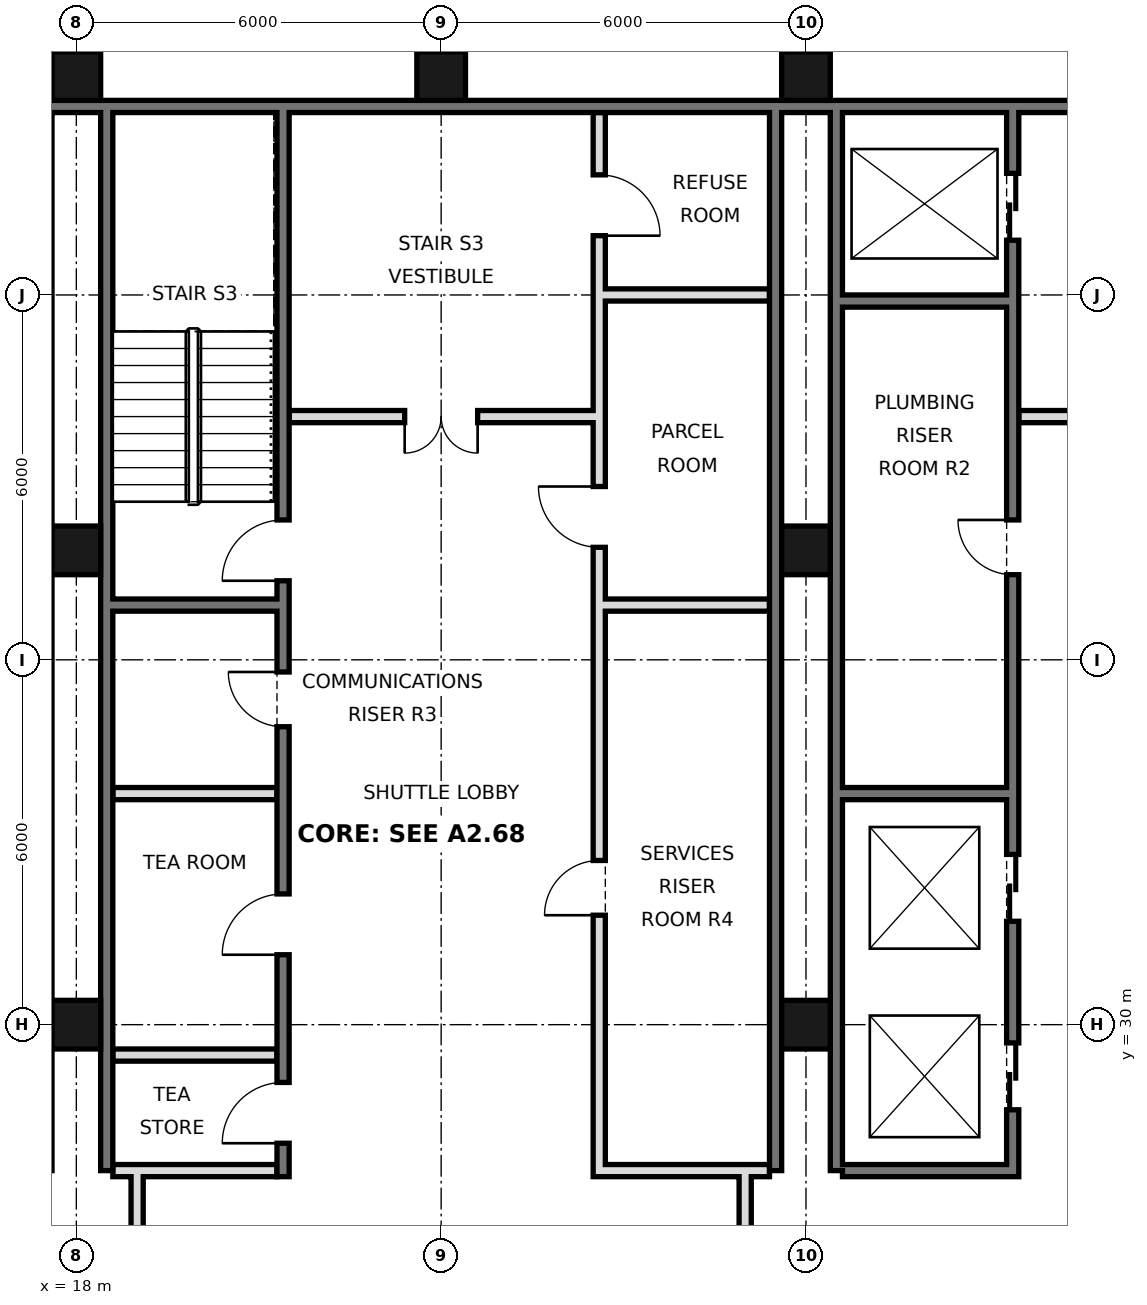
"""IFC4 building model, lengths in metres.
Left out: names, types, materials, properties, quantities, classifications, styles, units other than length and angle.
Written with IfcOpenShell. Run it as: python <this file> out.ifc"""

import sys

from ifc_helpers import new_model, si_unit, direction, frame, frame_2d, origin, origin_2d, place, context, subcontext, project, spatial, rectangle, hollow_rectangle, extrude, element, fill, save


model = new_model("IFC4")
c1 = context("Model", 3, precision=1e-05, world=origin(), true_north=direction((0.0, 1.0)))
c2 = subcontext(c1, "Body", "Model", "MODEL_VIEW")
j1 = project(units=[si_unit("LENGTHUNIT", "METRE"), si_unit("PLANEANGLEUNIT", "RADIAN")], contexts=[c1])
p1 = place(None, origin())
s1 = spatial("IfcSite", under=j1, at=p1, CompositionType="ELEMENT")
p2 = place(p1, origin())
s2 = spatial("IfcBuilding", under=s1, at=p2, CompositionType="ELEMENT")
p3 = place(p2, frame((0.0, 0.0, 270.2)))
s3 = spatial("IfcBuildingStorey", under=s2, at=p3, CompositionType="ELEMENT", Elevation=270.2)
for number, where, z_axis, x_axis in (
    (1, (18.0, 30.0, 0.0), (0.0, 0.0, 1.0), (1.0, 0.0, 0.0)),
    (2, (18.0, 37.8, 0.0), (0.0, 0.0, 1.0), (1.0, 0.0, 0.0)),
    (3, (18.0, 45.6, 0.0), (0.0, 0.0, 1.0), (1.0, 0.0, 0.0)),
    (4, (24.0, 45.6, 0.0), (0.0, 0.0, 1.0), (1.0, 0.0, 0.0)),
    (5, (30.0, 30.0, 0.0), (0.0, 0.0, 1.0), (1.0, 0.0, 0.0)),
    (6, (30.0, 37.8, 0.0), (0.0, 0.0, 1.0), (1.0, 0.0, 0.0)),
    (7, (30.0, 45.6, 0.0), (0.0, 0.0, 1.0), (1.0, 0.0, 0.0)),
):
    element("IfcColumn", number, at=place(p3, frame(where, z_axis=z_axis, x_axis=x_axis)), inside=s3, PredefinedType="COLUMN", context=c2, shape_type="SweptSolid", body=[
        extrude(hollow_rectangle(XDim=0.8, YDim=0.8, WallThickness=0.032, at=origin_2d()), origin(), (0.0, 0.0, 1.0), 3.6),
    ])
p4 = place(p3, frame((6.6, 45.1, 0.0), z_axis=(0.0, 0.0, 1.0), x_axis=(1.0, 0.0, 0.0)))
e8 = element("IfcWall", 8, at=p4, inside=s3, PredefinedType="SOLIDWALL", context=c2, shape_type="SweptSolid", body=[
    extrude(rectangle(XDim=34.8, YDim=0.2, at=frame_2d((17.4, 0.0))), origin(), (0.0, 0.0, 1.0), 3.42),
])
for number, where, z_axis, x_axis in (
    (9, (18.5, 27.6, 0.0), (0.0, 0.0, 1.0), (0.0, 1.0, 0.0)),
    (10, (29.5, 27.6, 0.0), (0.0, 0.0, 1.0), (0.0, 1.0, 0.0)),
    (11, (30.5, 27.6, 0.0), (0.0, 0.0, 1.0), (0.0, 1.0, 0.0)),
):
    element("IfcWall", number, at=place(p3, frame(where, z_axis=z_axis, x_axis=x_axis)), inside=s3, PredefinedType="SOLIDWALL", context=c2, shape_type="SweptSolid", body=[
        extrude(rectangle(XDim=17.5, YDim=0.2, at=frame_2d((8.75, 0.0))), origin(), (0.0, 0.0, 1.0), 3.42),
    ])
p5 = place(p3, frame((19.0, 21.6, 0.0), z_axis=(0.0, 0.0, 1.0), x_axis=(0.0, 1.0, 0.0)))
e12 = element("IfcWall", 12, at=p5, inside=s3, PredefinedType="PARTITIONING", context=c2, shape_type="SweptSolid", body=[
    extrude(rectangle(XDim=6.0, YDim=0.2, at=frame_2d((3.0, 0.0))), origin(), (0.0, 0.0, 1.0), 3.42),
])
p6 = place(p5, frame((2.1, 0.0, 0.0)))
e13 = element("IfcOpeningElement", 13, at=p6, cuts=e12, PredefinedType="OPENING", context=c2, shape_type="SweptSolid", body=[
    extrude(rectangle(XDim=1.8, YDim=2.1, at=frame_2d((0.9, 1.05))), frame((0.0, 0.11, 0.0), z_axis=(0.0, -1.0, 0.0), x_axis=(1.0, 0.0, 0.0)), (0.0, 0.0, 1.0), 0.22),
])
p7 = place(p3, frame((29.0, 21.6, 0.0), z_axis=(0.0, 0.0, 1.0), x_axis=(0.0, 1.0, 0.0)))
e14 = element("IfcWall", 14, at=p7, inside=s3, PredefinedType="PARTITIONING", context=c2, shape_type="SweptSolid", body=[
    extrude(rectangle(XDim=6.0, YDim=0.2, at=frame_2d((3.0, 0.0))), origin(), (0.0, 0.0, 1.0), 3.42),
])
p8 = place(p7, frame((2.1, 0.0, 0.0)))
e15 = element("IfcOpeningElement", 15, at=p8, cuts=e14, PredefinedType="OPENING", context=c2, shape_type="SweptSolid", body=[
    extrude(rectangle(XDim=1.8, YDim=2.1, at=frame_2d((0.9, 1.05))), frame((0.0, 0.11, 0.0), z_axis=(0.0, -1.0, 0.0), x_axis=(1.0, 0.0, 0.0)), (0.0, 0.0, 1.0), 0.22),
])
p9 = place(p3, frame((21.4, 27.5, 0.0), z_axis=(0.0, 0.0, 1.0), x_axis=(0.0, 1.0, 0.0)))
e16 = element("IfcWall", 16, at=p9, inside=s3, PredefinedType="SOLIDWALL", context=c2, shape_type="SweptSolid", body=[
    extrude(rectangle(XDim=17.5, YDim=0.2, at=frame_2d((8.75, 0.0))), origin(), (0.0, 0.0, 1.0), 3.42),
])
p10 = place(p9, frame((0.55, 0.0, 0.0)))
e17 = element("IfcOpeningElement", 17, at=p10, cuts=e16, PredefinedType="OPENING", context=c2, shape_type="SweptSolid", body=[
    extrude(rectangle(XDim=1.0, YDim=2.1, at=frame_2d((0.5, 1.05))), frame((0.0, 0.11, 0.0), z_axis=(0.0, -1.0, 0.0), x_axis=(1.0, 0.0, 0.0)), (0.0, 0.0, 1.0), 0.22),
])
p11 = place(p9, frame((3.65, 0.0, 0.0)))
e18 = element("IfcOpeningElement", 18, at=p11, cuts=e16, PredefinedType="OPENING", context=c2, shape_type="SweptSolid", body=[
    extrude(rectangle(XDim=1.0, YDim=2.1, at=frame_2d((0.5, 1.05))), frame((0.0, 0.11, 0.0), z_axis=(0.0, -1.0, 0.0), x_axis=(1.0, 0.0, 0.0)), (0.0, 0.0, 1.0), 0.22),
])
p12 = place(p9, frame((9.8, 0.0, 0.0)))
e19 = element("IfcOpeningElement", 19, at=p12, cuts=e16, PredefinedType="OPENING", context=c2, shape_type="SweptSolid", body=[
    extrude(rectangle(XDim=1.0, YDim=2.1, at=frame_2d((0.5, 1.05))), frame((0.0, 0.11, 0.0), z_axis=(0.0, -1.0, 0.0), x_axis=(1.0, 0.0, 0.0)), (0.0, 0.0, 1.0), 0.22),
])
p13 = place(p9, frame((7.4, 0.0, 0.0)))
e20 = element("IfcOpeningElement", 20, at=p13, cuts=e16, PredefinedType="OPENING", context=c2, shape_type="SweptSolid", body=[
    extrude(rectangle(XDim=0.9, YDim=2.1, at=frame_2d((0.45, 1.05))), frame((0.0, 0.11, 0.0), z_axis=(0.0, -1.0, 0.0), x_axis=(1.0, 0.0, 0.0)), (0.0, 0.0, 1.0), 0.22),
])
p14 = place(p3, frame((26.6, 27.5, 0.0), z_axis=(0.0, 0.0, 1.0), x_axis=(0.0, 1.0, 0.0)))
e21 = element("IfcWall", 21, at=p14, inside=s3, PredefinedType="SOLIDWALL", context=c2, shape_type="SweptSolid", body=[
    extrude(rectangle(XDim=17.5, YDim=0.2, at=frame_2d((8.75, 0.0))), origin(), (0.0, 0.0, 1.0), 3.42),
])
p15 = place(p14, frame((4.3, 0.0, 0.0)))
e22 = element("IfcOpeningElement", 22, at=p15, cuts=e21, PredefinedType="OPENING", context=c2, shape_type="SweptSolid", body=[
    extrude(rectangle(XDim=0.9, YDim=2.1, at=frame_2d((0.45, 1.05))), frame((0.0, 0.11, 0.0), z_axis=(0.0, -1.0, 0.0), x_axis=(1.0, 0.0, 0.0)), (0.0, 0.0, 1.0), 0.22),
])
p16 = place(p14, frame((10.35, 0.0, 0.0)))
e23 = element("IfcOpeningElement", 23, at=p16, cuts=e21, PredefinedType="OPENING", context=c2, shape_type="SweptSolid", body=[
    extrude(rectangle(XDim=1.0, YDim=2.1, at=frame_2d((0.5, 1.05))), frame((0.0, 0.11, 0.0), z_axis=(0.0, -1.0, 0.0), x_axis=(1.0, 0.0, 0.0)), (0.0, 0.0, 1.0), 0.22),
])
p17 = place(p14, frame((15.475, 0.0, 0.0)))
e24 = element("IfcOpeningElement", 24, at=p17, cuts=e21, PredefinedType="OPENING", context=c2, shape_type="SweptSolid", body=[
    extrude(rectangle(XDim=1.0, YDim=2.1, at=frame_2d((0.5, 1.05))), frame((0.0, 0.11, 0.0), z_axis=(0.0, -1.0, 0.0), x_axis=(1.0, 0.0, 0.0)), (0.0, 0.0, 1.0), 0.22),
])
p18 = place(p3, frame((33.4, 27.5, 0.0), z_axis=(0.0, 0.0, 1.0), x_axis=(0.0, 1.0, 0.0)))
e25 = element("IfcWall", 25, at=p18, inside=s3, PredefinedType="SOLIDWALL", context=c2, shape_type="SweptSolid", body=[
    extrude(rectangle(XDim=17.5, YDim=0.2, at=frame_2d((8.75, 0.0))), origin(), (0.0, 0.0, 1.0), 3.42),
])
p19 = place(p18, frame((1.1, 0.0, 0.0)))
e26 = element("IfcOpeningElement", 26, at=p19, cuts=e25, PredefinedType="OPENING", context=c2, shape_type="SweptSolid", body=[
    extrude(rectangle(XDim=1.1, YDim=2.1, at=frame_2d((0.55, 1.05))), frame((0.0, 0.11, 0.0), z_axis=(0.0, -1.0, 0.0), x_axis=(1.0, 0.0, 0.0)), (0.0, 0.0, 1.0), 0.22),
])
p20 = place(p18, frame((4.2, 0.0, 0.0)))
e27 = element("IfcOpeningElement", 27, at=p20, cuts=e25, PredefinedType="OPENING", context=c2, shape_type="SweptSolid", body=[
    extrude(rectangle(XDim=1.1, YDim=2.1, at=frame_2d((0.55, 1.05))), frame((0.0, 0.11, 0.0), z_axis=(0.0, -1.0, 0.0), x_axis=(1.0, 0.0, 0.0)), (0.0, 0.0, 1.0), 0.22),
])
p21 = place(p18, frame((15.4, 0.0, 0.0)))
e28 = element("IfcOpeningElement", 28, at=p21, cuts=e25, PredefinedType="OPENING", context=c2, shape_type="SweptSolid", body=[
    extrude(rectangle(XDim=1.1, YDim=2.1, at=frame_2d((0.55, 1.05))), frame((0.0, 0.11, 0.0), z_axis=(0.0, -1.0, 0.0), x_axis=(1.0, 0.0, 0.0)), (0.0, 0.0, 1.0), 0.22),
])
p22 = place(p18, frame((9.9, 0.0, 0.0)))
e29 = element("IfcOpeningElement", 29, at=p22, cuts=e25, PredefinedType="OPENING", context=c2, shape_type="SweptSolid", body=[
    extrude(rectangle(XDim=0.9, YDim=2.1, at=frame_2d((0.45, 1.05))), frame((0.0, 0.11, 0.0), z_axis=(0.0, -1.0, 0.0), x_axis=(1.0, 0.0, 0.0)), (0.0, 0.0, 1.0), 0.22),
])
p23 = place(p3, frame((18.6, 27.6, 0.0), z_axis=(0.0, 0.0, 1.0), x_axis=(1.0, 0.0, 0.0)))
e30 = element("IfcWall", 30, at=p23, inside=s3, PredefinedType="PARTITIONING", context=c2, shape_type="SweptSolid", body=[
    extrude(rectangle(XDim=2.7, YDim=0.2, at=frame_2d((1.35, 0.0))), origin(), (0.0, 0.0, 1.0), 3.42),
])
for number, where, z_axis, x_axis in (
    (31, (26.7, 27.6, 0.0), (0.0, 0.0, 1.0), (1.0, 0.0, 0.0)),
    (32, (30.6, 27.6, 0.0), (0.0, 0.0, 1.0), (1.0, 0.0, 0.0)),
):
    element("IfcWall", number, at=place(p3, frame(where, z_axis=z_axis, x_axis=x_axis)), inside=s3, PredefinedType="SOLIDWALL", context=c2, shape_type="SweptSolid", body=[
        extrude(rectangle(XDim=2.7, YDim=0.2, at=frame_2d((1.35, 0.0))), origin(), (0.0, 0.0, 1.0), 3.42),
    ])
p24 = place(p3, frame((18.6, 29.5, 0.0), z_axis=(0.0, 0.0, 1.0), x_axis=(1.0, 0.0, 0.0)))
e33 = element("IfcWall", 33, at=p24, inside=s3, PredefinedType="PARTITIONING", context=c2, shape_type="SweptSolid", body=[
    extrude(rectangle(XDim=2.7, YDim=0.2, at=frame_2d((1.35, 0.0))), origin(), (0.0, 0.0, 1.0), 3.42),
])
for number, where, z_axis, x_axis in (
    (34, (18.6, 33.8, 0.0), (0.0, 0.0, 1.0), (1.0, 0.0, 0.0)),
    (35, (30.6, 33.8, 0.0), (0.0, 0.0, 1.0), (1.0, 0.0, 0.0)),
    (36, (18.6, 36.9, 0.0), (0.0, 0.0, 1.0), (1.0, 0.0, 0.0)),
    (37, (26.7, 36.9, 0.0), (0.0, 0.0, 1.0), (1.0, 0.0, 0.0)),
):
    element("IfcWall", number, at=place(p3, frame(where, z_axis=z_axis, x_axis=x_axis)), inside=s3, PredefinedType="SOLIDWALL", context=c2, shape_type="SweptSolid", body=[
        extrude(rectangle(XDim=2.7, YDim=0.2, at=frame_2d((1.35, 0.0))), origin(), (0.0, 0.0, 1.0), 3.42),
    ])
p25 = place(p3, frame((21.5, 40.0, 0.0), z_axis=(0.0, 0.0, 1.0), x_axis=(1.0, 0.0, 0.0)))
e38 = element("IfcWall", 38, at=p25, inside=s3, PredefinedType="PARTITIONING", context=c2, shape_type="SweptSolid", body=[
    extrude(rectangle(XDim=5.0, YDim=0.2, at=frame_2d((2.5, 0.0))), origin(), (0.0, 0.0, 1.0), 3.42),
])
p26 = place(p25, frame((1.9, 0.0, 0.0)))
e39 = element("IfcOpeningElement", 39, at=p26, cuts=e38, PredefinedType="OPENING", context=c2, shape_type="SweptSolid", body=[
    extrude(rectangle(XDim=1.2, YDim=2.1, at=frame_2d((0.6, 1.05))), frame((0.0, 0.11, 0.0), z_axis=(0.0, -1.0, 0.0), x_axis=(1.0, 0.0, 0.0)), (0.0, 0.0, 1.0), 0.22),
])
p27 = place(p3, frame((33.5, 40.0, 0.0), z_axis=(0.0, 0.0, 1.0), x_axis=(1.0, 0.0, 0.0)))
e40 = element("IfcWall", 40, at=p27, inside=s3, PredefinedType="PARTITIONING", context=c2, shape_type="SweptSolid", body=[
    extrude(rectangle(XDim=5.0, YDim=0.2, at=frame_2d((2.5, 0.0))), origin(), (0.0, 0.0, 1.0), 3.42),
])
p28 = place(p27, frame((1.9, 0.0, 0.0)))
e41 = element("IfcOpeningElement", 41, at=p28, cuts=e40, PredefinedType="OPENING", context=c2, shape_type="SweptSolid", body=[
    extrude(rectangle(XDim=1.2, YDim=2.1, at=frame_2d((0.6, 1.05))), frame((0.0, 0.11, 0.0), z_axis=(0.0, -1.0, 0.0), x_axis=(1.0, 0.0, 0.0)), (0.0, 0.0, 1.0), 0.22),
])
p29 = place(p3, frame((30.6, 41.9, 0.0), z_axis=(0.0, 0.0, 1.0), x_axis=(1.0, 0.0, 0.0)))
e42 = element("IfcWall", 42, at=p29, inside=s3, PredefinedType="SOLIDWALL", context=c2, shape_type="SweptSolid", body=[
    extrude(rectangle(XDim=2.7, YDim=0.2, at=frame_2d((1.35, 0.0))), origin(), (0.0, 0.0, 1.0), 3.42),
])
p30 = place(p3, frame((26.7, 42.0, 0.0), z_axis=(0.0, 0.0, 1.0), x_axis=(1.0, 0.0, 0.0)))
e43 = element("IfcWall", 43, at=p30, inside=s3, PredefinedType="PARTITIONING", context=c2, shape_type="SweptSolid", body=[
    extrude(rectangle(XDim=2.7, YDim=0.2, at=frame_2d((1.35, 0.0))), origin(), (0.0, 0.0, 1.0), 3.42),
])
p31 = place(p26, frame((1.2, 0.0, 0.0), z_axis=(0.0, 0.0, 1.0), x_axis=(-1.0, 0.0, 0.0)))
e44 = element("IfcDoor", 44, at=p31, inside=s3, OperationType="DOUBLE_DOOR_SINGLE_SWING", PredefinedType="DOOR", context=c2, shape_type="SweptSolid", body=[
    extrude(rectangle(XDim=1.2, YDim=2.1, at=frame_2d((0.6, 1.05))), frame((0.0, 0.025, 0.0), z_axis=(0.0, -1.0, 0.0), x_axis=(1.0, 0.0, 0.0)), (0.0, 0.0, 1.0), 0.05),
])
fill(e39, e44)
p32 = place(p19, origin())
e45 = element("IfcDoor", 45, at=p32, inside=s3, OperationType="DOUBLE_DOOR_SLIDING", PredefinedType="DOOR", context=c2, shape_type="SweptSolid", body=[
    extrude(rectangle(XDim=1.1, YDim=2.1, at=frame_2d((0.55, 1.05))), frame((0.0, 0.025, 0.0), z_axis=(0.0, -1.0, 0.0), x_axis=(1.0, 0.0, 0.0)), (0.0, 0.0, 1.0), 0.05),
])
fill(e26, e45)
p33 = place(p20, origin())
e46 = element("IfcDoor", 46, at=p33, inside=s3, OperationType="DOUBLE_DOOR_SLIDING", PredefinedType="DOOR", context=c2, shape_type="SweptSolid", body=[
    extrude(rectangle(XDim=1.1, YDim=2.1, at=frame_2d((0.55, 1.05))), frame((0.0, 0.025, 0.0), z_axis=(0.0, -1.0, 0.0), x_axis=(1.0, 0.0, 0.0)), (0.0, 0.0, 1.0), 0.05),
])
fill(e27, e46)
p34 = place(p21, origin())
e47 = element("IfcDoor", 47, at=p34, inside=s3, OperationType="DOUBLE_DOOR_SLIDING", PredefinedType="DOOR", context=c2, shape_type="SweptSolid", body=[
    extrude(rectangle(XDim=1.1, YDim=2.1, at=frame_2d((0.55, 1.05))), frame((0.0, 0.025, 0.0), z_axis=(0.0, -1.0, 0.0), x_axis=(1.0, 0.0, 0.0)), (0.0, 0.0, 1.0), 0.05),
])
fill(e28, e47)
p35 = place(p10, origin())
e48 = element("IfcDoor", 48, at=p35, inside=s3, OperationType="SINGLE_SWING_LEFT", PredefinedType="DOOR", context=c2, shape_type="SweptSolid", body=[
    extrude(rectangle(XDim=1.0, YDim=2.1, at=frame_2d((0.5, 1.05))), frame((0.0, 0.025, 0.0), z_axis=(0.0, -1.0, 0.0), x_axis=(1.0, 0.0, 0.0)), (0.0, 0.0, 1.0), 0.05),
])
fill(e17, e48)
p36 = place(p11, origin())
e49 = element("IfcDoor", 49, at=p36, inside=s3, OperationType="SINGLE_SWING_LEFT", PredefinedType="DOOR", context=c2, shape_type="SweptSolid", body=[
    extrude(rectangle(XDim=1.0, YDim=2.1, at=frame_2d((0.5, 1.05))), frame((0.0, 0.025, 0.0), z_axis=(0.0, -1.0, 0.0), x_axis=(1.0, 0.0, 0.0)), (0.0, 0.0, 1.0), 0.05),
])
fill(e18, e49)
p37 = place(p12, origin())
e50 = element("IfcDoor", 50, at=p37, inside=s3, OperationType="SINGLE_SWING_LEFT", PredefinedType="DOOR", context=c2, shape_type="SweptSolid", body=[
    extrude(rectangle(XDim=1.0, YDim=2.1, at=frame_2d((0.5, 1.05))), frame((0.0, 0.025, 0.0), z_axis=(0.0, -1.0, 0.0), x_axis=(1.0, 0.0, 0.0)), (0.0, 0.0, 1.0), 0.05),
])
fill(e19, e50)
p38 = place(p22, frame((0.9, 0.0, 0.0), z_axis=(0.0, 0.0, 1.0), x_axis=(-1.0, 0.0, 0.0)))
e51 = element("IfcDoor", 51, at=p38, inside=s3, OperationType="SINGLE_SWING_LEFT", PredefinedType="DOOR", context=c2, shape_type="SweptSolid", body=[
    extrude(rectangle(XDim=0.9, YDim=2.1, at=frame_2d((0.45, 1.05))), frame((0.0, 0.025, 0.0), z_axis=(0.0, -1.0, 0.0), x_axis=(1.0, 0.0, 0.0)), (0.0, 0.0, 1.0), 0.05),
])
fill(e29, e51)
p39 = place(p13, frame((0.9, 0.0, 0.0), z_axis=(0.0, 0.0, 1.0), x_axis=(-1.0, 0.0, 0.0)))
e52 = element("IfcDoor", 52, at=p39, inside=s3, OperationType="SINGLE_SWING_LEFT", PredefinedType="DOOR", context=c2, shape_type="SweptSolid", body=[
    extrude(rectangle(XDim=0.9, YDim=2.1, at=frame_2d((0.45, 1.05))), frame((0.0, 0.025, 0.0), z_axis=(0.0, -1.0, 0.0), x_axis=(1.0, 0.0, 0.0)), (0.0, 0.0, 1.0), 0.05),
])
fill(e20, e52)
p40 = place(p15, origin())
e53 = element("IfcDoor", 53, at=p40, inside=s3, OperationType="SINGLE_SWING_LEFT", PredefinedType="DOOR", context=c2, shape_type="SweptSolid", body=[
    extrude(rectangle(XDim=0.9, YDim=2.1, at=frame_2d((0.45, 1.05))), frame((0.0, 0.025, 0.0), z_axis=(0.0, -1.0, 0.0), x_axis=(1.0, 0.0, 0.0)), (0.0, 0.0, 1.0), 0.05),
])
fill(e22, e53)
p41 = place(p16, frame((1.0, 0.0, 0.0), z_axis=(0.0, 0.0, 1.0), x_axis=(-1.0, 0.0, 0.0)))
e54 = element("IfcDoor", 54, at=p41, inside=s3, OperationType="SINGLE_SWING_LEFT", PredefinedType="DOOR", context=c2, shape_type="SweptSolid", body=[
    extrude(rectangle(XDim=1.0, YDim=2.1, at=frame_2d((0.5, 1.05))), frame((0.0, 0.025, 0.0), z_axis=(0.0, -1.0, 0.0), x_axis=(1.0, 0.0, 0.0)), (0.0, 0.0, 1.0), 0.05),
])
fill(e23, e54)
p42 = place(p17, frame((1.0, 0.0, 0.0), z_axis=(0.0, 0.0, 1.0), x_axis=(-1.0, 0.0, 0.0)))
e55 = element("IfcDoor", 55, at=p42, inside=s3, OperationType="SINGLE_SWING_RIGHT", PredefinedType="DOOR", context=c2, shape_type="SweptSolid", body=[
    extrude(rectangle(XDim=1.0, YDim=2.1, at=frame_2d((0.5, 1.05))), frame((0.0, 0.025, 0.0), z_axis=(0.0, -1.0, 0.0), x_axis=(1.0, 0.0, 0.0)), (0.0, 0.0, 1.0), 0.05),
])
fill(e24, e55)
save(model, sys.argv[1])
